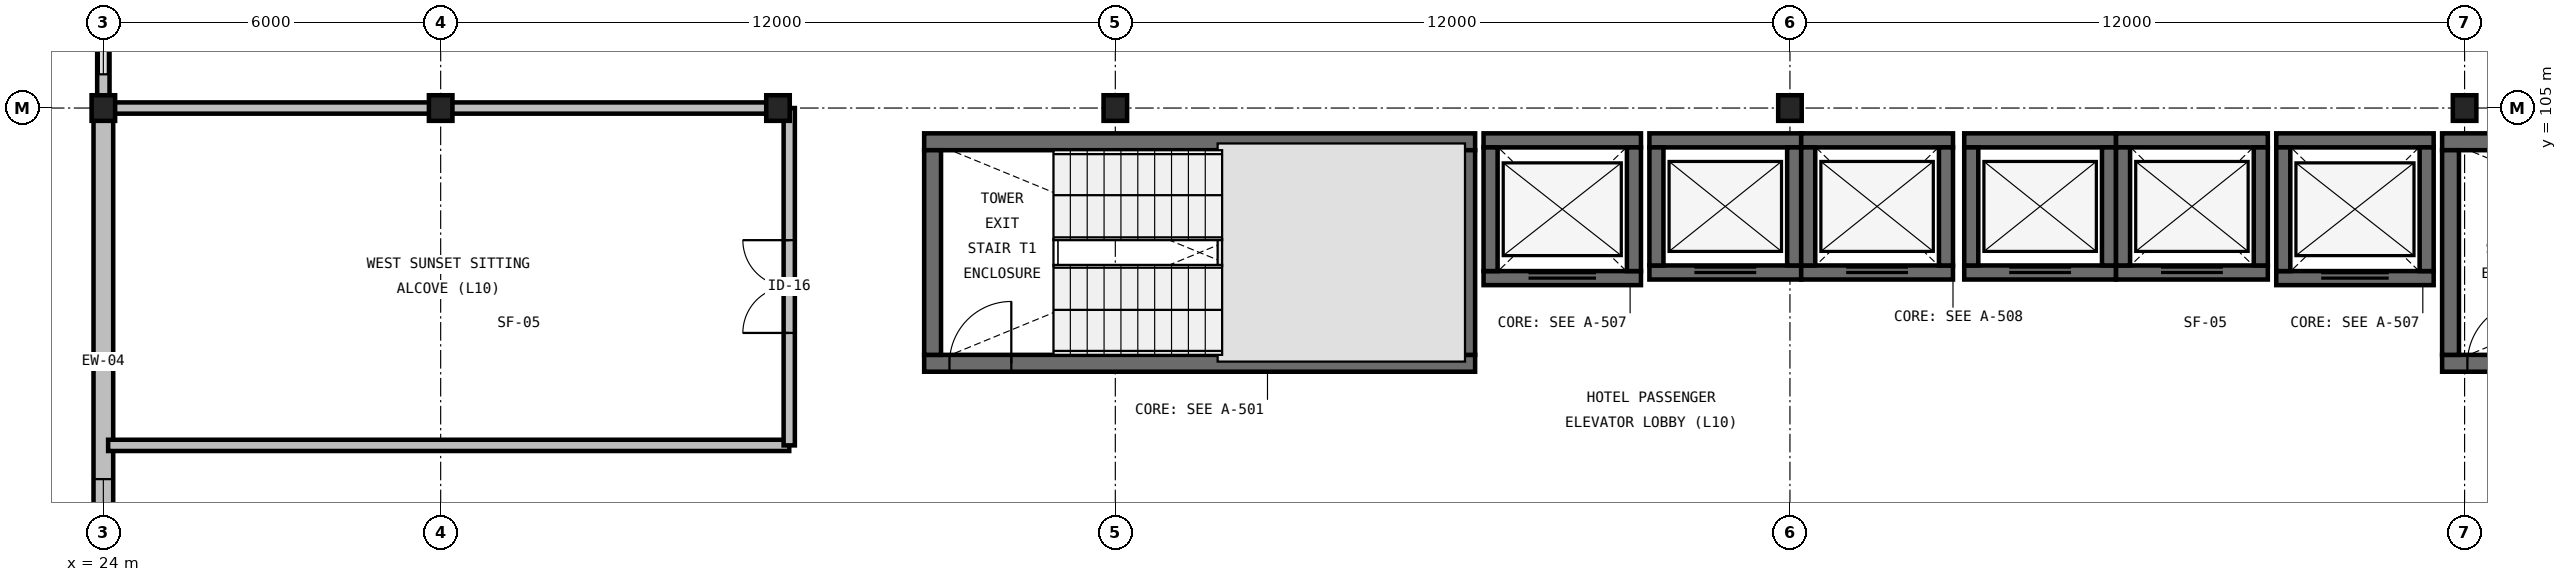
"""IFC4 building model, lengths in metres.
Left out: names, types, materials, properties, quantities, classifications, styles, units other than length and angle.
Written with IfcOpenShell. Run it as: python <this file> out.ifc"""

import sys

from ifc_helpers import new_model, si_unit, direction, frame, frame_2d, origin, origin_2d, place, context, subcontext, project, spatial, rectangle, i_section, extrude, element, fill, save


model = new_model("IFC4")
c1 = context("Model", 3, precision=1e-05, world=origin(), true_north=direction((0.0, 1.0)))
c2 = subcontext(c1, "Body", "Model", "MODEL_VIEW")
j1 = project(units=[si_unit("LENGTHUNIT", "METRE"), si_unit("PLANEANGLEUNIT", "RADIAN")], contexts=[c1])
p1 = place(None, origin())
s1 = spatial("IfcSite", under=j1, at=p1, CompositionType="ELEMENT")
p2 = place(p1, origin())
s2 = spatial("IfcBuilding", under=s1, at=p2, CompositionType="ELEMENT")
p3 = place(p2, frame((0.0, 0.0, 45.6)))
s3 = spatial("IfcBuildingStorey", under=s2, at=p3, CompositionType="ELEMENT", Elevation=45.6)
for number, where, z_axis, x_axis in (
    (1, (24.0, 105.0, 0.0), (0.0, 0.0, 1.0), (1.0, 0.0, 0.0)),
    (2, (30.0, 105.0, 0.0), (0.0, 0.0, 1.0), (1.0, 0.0, 0.0)),
    (3, (36.0, 105.0, 0.0), (0.0, 0.0, 1.0), (1.0, 0.0, 0.0)),
    (4, (42.0, 105.0, 0.0), (0.0, 0.0, 1.0), (1.0, 0.0, 0.0)),
    (5, (54.0, 105.0, 0.0), (0.0, 0.0, 1.0), (1.0, 0.0, 0.0)),
    (6, (66.0, 105.0, 0.0), (0.0, 0.0, 1.0), (1.0, 0.0, 0.0)),
):
    element("IfcColumn", number, at=place(p3, frame(where, z_axis=z_axis, x_axis=x_axis)), inside=s3, PredefinedType="COLUMN", context=c2, shape_type="SweptSolid", body=[
        extrude(i_section(OverallWidth=0.419, OverallDepth=0.455, WebThickness=0.042, FlangeThickness=0.068, FilletRadius=0.031, at=origin_2d()), origin(), (0.0, 0.0, 1.0), 3.6),
    ])
p4 = place(p3, frame((38.6, 100.46, 0.0), z_axis=(0.0, 0.0, 1.0), x_axis=(1.0, 0.0, 0.0)))
e7 = element("IfcWall", 7, at=p4, inside=s3, PredefinedType="SHEAR", context=c2, shape_type="SweptSolid", body=[
    extrude(rectangle(XDim=9.8, YDim=0.3, at=frame_2d((4.9, 0.0))), origin(), (0.0, 0.0, 1.0), 3.6),
])
p5 = place(p4, frame((0.45, 0.0, 0.0)))
e8 = element("IfcOpeningElement", 8, at=p5, cuts=e7, PredefinedType="OPENING", context=c2, shape_type="SweptSolid", body=[
    extrude(rectangle(XDim=1.1, YDim=2.2, at=frame_2d((0.55, 1.1))), frame((0.0, 0.165, 0.0), z_axis=(0.0, -1.0, 0.0), x_axis=(1.0, 0.0, 0.0)), (0.0, 0.0, 1.0), 0.33),
])
p6 = place(p3, frame((48.4, 104.4, 0.0), z_axis=(0.0, 0.0, 1.0), x_axis=(-1.0, 0.0, 0.0)))
e9 = element("IfcWall", 9, at=p6, inside=s3, PredefinedType="SHEAR", context=c2, shape_type="SweptSolid", body=[
    extrude(rectangle(XDim=9.8, YDim=0.3, at=frame_2d((4.9, 0.0))), origin(), (0.0, 0.0, 1.0), 3.6),
])
for number, where, z_axis, x_axis in (
    (10, (38.75, 104.25, 0.0), (0.0, 0.0, 1.0), (0.0, -1.0, 0.0)),
    (11, (48.25, 100.61, 0.0), (0.0, 0.0, 1.0), (0.0, 1.0, 0.0)),
):
    element("IfcWall", number, at=place(p3, frame(where, z_axis=z_axis, x_axis=x_axis)), inside=s3, PredefinedType="SHEAR", context=c2, shape_type="SweptSolid", body=[
        extrude(rectangle(XDim=3.64, YDim=0.3, at=frame_2d((1.82, 0.0))), origin(), (0.0, 0.0, 1.0), 3.6),
    ])
p7 = place(p3, frame((65.6, 100.46, 0.0), z_axis=(0.0, 0.0, 1.0), x_axis=(1.0, 0.0, 0.0)))
e12 = element("IfcWall", 12, at=p7, inside=s3, PredefinedType="SHEAR", context=c2, shape_type="SweptSolid", body=[
    extrude(rectangle(XDim=9.8, YDim=0.3, at=frame_2d((4.9, 0.0))), origin(), (0.0, 0.0, 1.0), 3.6),
])
p8 = place(p7, frame((0.45, 0.0, 0.0)))
e13 = element("IfcOpeningElement", 13, at=p8, cuts=e12, PredefinedType="OPENING", context=c2, shape_type="SweptSolid", body=[
    extrude(rectangle(XDim=1.1, YDim=2.2, at=frame_2d((0.55, 1.1))), frame((0.0, 0.165, 0.0), z_axis=(0.0, -1.0, 0.0), x_axis=(1.0, 0.0, 0.0)), (0.0, 0.0, 1.0), 0.33),
])
p9 = place(p3, frame((75.4, 104.4, 0.0), z_axis=(0.0, 0.0, 1.0), x_axis=(-1.0, 0.0, 0.0)))
e14 = element("IfcWall", 14, at=p9, inside=s3, PredefinedType="SHEAR", context=c2, shape_type="SweptSolid", body=[
    extrude(rectangle(XDim=9.8, YDim=0.3, at=frame_2d((4.9, 0.0))), origin(), (0.0, 0.0, 1.0), 3.6),
])
p10 = place(p3, frame((65.75, 104.25, 0.0), z_axis=(0.0, 0.0, 1.0), x_axis=(0.0, -1.0, 0.0)))
e15 = element("IfcWall", 15, at=p10, inside=s3, PredefinedType="SHEAR", context=c2, shape_type="SweptSolid", body=[
    extrude(rectangle(XDim=3.64, YDim=0.3, at=frame_2d((1.82, 0.0))), origin(), (0.0, 0.0, 1.0), 3.6),
])
p11 = place(p3, frame((48.55, 101.975, 0.0), z_axis=(0.0, 0.0, 1.0), x_axis=(1.0, 0.0, 0.0)))
e16 = element("IfcWall", 16, at=p11, inside=s3, PredefinedType="SHEAR", context=c2, shape_type="SweptSolid", body=[
    extrude(rectangle(XDim=2.8, YDim=0.25, at=frame_2d((1.4, 0.0))), origin(), (0.0, 0.0, 1.0), 3.6),
])
p12 = place(p11, frame((0.8, 0.0, 0.0)))
e17 = element("IfcOpeningElement", 17, at=p12, cuts=e16, PredefinedType="OPENING", context=c2, shape_type="SweptSolid", body=[
    extrude(rectangle(XDim=1.2, YDim=2.2, at=frame_2d((0.6, 1.1))), frame((0.0, 0.14, 0.0), z_axis=(0.0, -1.0, 0.0), x_axis=(1.0, 0.0, 0.0)), (0.0, 0.0, 1.0), 0.28),
])
p13 = place(p3, frame((51.35, 104.425, 0.0), z_axis=(0.0, 0.0, 1.0), x_axis=(-1.0, 0.0, 0.0)))
e18 = element("IfcWall", 18, at=p13, inside=s3, PredefinedType="SHEAR", context=c2, shape_type="SweptSolid", body=[
    extrude(rectangle(XDim=2.8, YDim=0.25, at=frame_2d((1.4, 0.0))), origin(), (0.0, 0.0, 1.0), 3.6),
])
for number, where, z_axis, x_axis in (
    (19, (48.675, 104.3, 0.0), (0.0, 0.0, 1.0), (0.0, -1.0, 0.0)),
    (20, (51.225, 102.1, 0.0), (0.0, 0.0, 1.0), (0.0, 1.0, 0.0)),
):
    element("IfcWall", number, at=place(p3, frame(where, z_axis=z_axis, x_axis=x_axis)), inside=s3, PredefinedType="SHEAR", context=c2, shape_type="SweptSolid", body=[
        extrude(rectangle(XDim=2.2, YDim=0.25, at=frame_2d((1.1, 0.0))), origin(), (0.0, 0.0, 1.0), 3.6),
    ])
p14 = place(p3, frame((62.65, 101.975, 0.0), z_axis=(0.0, 0.0, 1.0), x_axis=(1.0, 0.0, 0.0)))
e21 = element("IfcWall", 21, at=p14, inside=s3, PredefinedType="SHEAR", context=c2, shape_type="SweptSolid", body=[
    extrude(rectangle(XDim=2.8, YDim=0.25, at=frame_2d((1.4, 0.0))), origin(), (0.0, 0.0, 1.0), 3.6),
])
p15 = place(p14, frame((0.8, 0.0, 0.0)))
e22 = element("IfcOpeningElement", 22, at=p15, cuts=e21, PredefinedType="OPENING", context=c2, shape_type="SweptSolid", body=[
    extrude(rectangle(XDim=1.2, YDim=2.2, at=frame_2d((0.6, 1.1))), frame((0.0, 0.14, 0.0), z_axis=(0.0, -1.0, 0.0), x_axis=(1.0, 0.0, 0.0)), (0.0, 0.0, 1.0), 0.28),
])
p16 = place(p3, frame((65.45, 104.425, 0.0), z_axis=(0.0, 0.0, 1.0), x_axis=(-1.0, 0.0, 0.0)))
e23 = element("IfcWall", 23, at=p16, inside=s3, PredefinedType="SHEAR", context=c2, shape_type="SweptSolid", body=[
    extrude(rectangle(XDim=2.8, YDim=0.25, at=frame_2d((1.4, 0.0))), origin(), (0.0, 0.0, 1.0), 3.6),
])
for number, where, z_axis, x_axis in (
    (24, (62.775, 104.3, 0.0), (0.0, 0.0, 1.0), (0.0, -1.0, 0.0)),
    (25, (65.325, 102.1, 0.0), (0.0, 0.0, 1.0), (0.0, 1.0, 0.0)),
):
    element("IfcWall", number, at=place(p3, frame(where, z_axis=z_axis, x_axis=x_axis)), inside=s3, PredefinedType="SHEAR", context=c2, shape_type="SweptSolid", body=[
        extrude(rectangle(XDim=2.2, YDim=0.25, at=frame_2d((1.1, 0.0))), origin(), (0.0, 0.0, 1.0), 3.6),
    ])
p17 = place(p3, frame((51.5, 102.075, 0.0), z_axis=(0.0, 0.0, 1.0), x_axis=(1.0, 0.0, 0.0)))
e26 = element("IfcWall", 26, at=p17, inside=s3, PredefinedType="SHEAR", context=c2, shape_type="SweptSolid", body=[
    extrude(rectangle(XDim=2.7, YDim=0.25, at=frame_2d((1.35, 0.0))), origin(), (0.0, 0.0, 1.0), 3.6),
])
p18 = place(p17, frame((0.8, 0.0, 0.0)))
e27 = element("IfcOpeningElement", 27, at=p18, cuts=e26, PredefinedType="OPENING", context=c2, shape_type="SweptSolid", body=[
    extrude(rectangle(XDim=1.1, YDim=2.2, at=frame_2d((0.55, 1.1))), frame((0.0, 0.14, 0.0), z_axis=(0.0, -1.0, 0.0), x_axis=(1.0, 0.0, 0.0)), (0.0, 0.0, 1.0), 0.28),
])
p19 = place(p3, frame((54.2, 104.425, 0.0), z_axis=(0.0, 0.0, 1.0), x_axis=(-1.0, 0.0, 0.0)))
e28 = element("IfcWall", 28, at=p19, inside=s3, PredefinedType="SHEAR", context=c2, shape_type="SweptSolid", body=[
    extrude(rectangle(XDim=2.7, YDim=0.25, at=frame_2d((1.35, 0.0))), origin(), (0.0, 0.0, 1.0), 3.6),
])
for number, where, z_axis, x_axis in (
    (29, (51.625, 104.3, 0.0), (0.0, 0.0, 1.0), (0.0, -1.0, 0.0)),
    (30, (54.075, 102.2, 0.0), (0.0, 0.0, 1.0), (0.0, 1.0, 0.0)),
):
    element("IfcWall", number, at=place(p3, frame(where, z_axis=z_axis, x_axis=x_axis)), inside=s3, PredefinedType="SHEAR", context=c2, shape_type="SweptSolid", body=[
        extrude(rectangle(XDim=2.1, YDim=0.25, at=frame_2d((1.05, 0.0))), origin(), (0.0, 0.0, 1.0), 3.6),
    ])
p20 = place(p3, frame((54.2, 102.075, 0.0), z_axis=(0.0, 0.0, 1.0), x_axis=(1.0, 0.0, 0.0)))
e31 = element("IfcWall", 31, at=p20, inside=s3, PredefinedType="SHEAR", context=c2, shape_type="SweptSolid", body=[
    extrude(rectangle(XDim=2.7, YDim=0.25, at=frame_2d((1.35, 0.0))), origin(), (0.0, 0.0, 1.0), 3.6),
])
p21 = place(p20, frame((0.8, 0.0, 0.0)))
e32 = element("IfcOpeningElement", 32, at=p21, cuts=e31, PredefinedType="OPENING", context=c2, shape_type="SweptSolid", body=[
    extrude(rectangle(XDim=1.1, YDim=2.2, at=frame_2d((0.55, 1.1))), frame((0.0, 0.14, 0.0), z_axis=(0.0, -1.0, 0.0), x_axis=(1.0, 0.0, 0.0)), (0.0, 0.0, 1.0), 0.28),
])
p22 = place(p3, frame((56.9, 104.425, 0.0), z_axis=(0.0, 0.0, 1.0), x_axis=(-1.0, 0.0, 0.0)))
e33 = element("IfcWall", 33, at=p22, inside=s3, PredefinedType="SHEAR", context=c2, shape_type="SweptSolid", body=[
    extrude(rectangle(XDim=2.7, YDim=0.25, at=frame_2d((1.35, 0.0))), origin(), (0.0, 0.0, 1.0), 3.6),
])
for number, where, z_axis, x_axis in (
    (34, (54.325, 104.3, 0.0), (0.0, 0.0, 1.0), (0.0, -1.0, 0.0)),
    (35, (56.775, 102.2, 0.0), (0.0, 0.0, 1.0), (0.0, 1.0, 0.0)),
):
    element("IfcWall", number, at=place(p3, frame(where, z_axis=z_axis, x_axis=x_axis)), inside=s3, PredefinedType="SHEAR", context=c2, shape_type="SweptSolid", body=[
        extrude(rectangle(XDim=2.1, YDim=0.25, at=frame_2d((1.05, 0.0))), origin(), (0.0, 0.0, 1.0), 3.6),
    ])
p23 = place(p3, frame((57.1, 102.075, 0.0), z_axis=(0.0, 0.0, 1.0), x_axis=(1.0, 0.0, 0.0)))
e36 = element("IfcWall", 36, at=p23, inside=s3, PredefinedType="SHEAR", context=c2, shape_type="SweptSolid", body=[
    extrude(rectangle(XDim=2.7, YDim=0.25, at=frame_2d((1.35, 0.0))), origin(), (0.0, 0.0, 1.0), 3.6),
])
p24 = place(p23, frame((0.8, 0.0, 0.0)))
e37 = element("IfcOpeningElement", 37, at=p24, cuts=e36, PredefinedType="OPENING", context=c2, shape_type="SweptSolid", body=[
    extrude(rectangle(XDim=1.1, YDim=2.2, at=frame_2d((0.55, 1.1))), frame((0.0, 0.14, 0.0), z_axis=(0.0, -1.0, 0.0), x_axis=(1.0, 0.0, 0.0)), (0.0, 0.0, 1.0), 0.28),
])
p25 = place(p3, frame((59.8, 104.425, 0.0), z_axis=(0.0, 0.0, 1.0), x_axis=(-1.0, 0.0, 0.0)))
e38 = element("IfcWall", 38, at=p25, inside=s3, PredefinedType="SHEAR", context=c2, shape_type="SweptSolid", body=[
    extrude(rectangle(XDim=2.7, YDim=0.25, at=frame_2d((1.35, 0.0))), origin(), (0.0, 0.0, 1.0), 3.6),
])
for number, where, z_axis, x_axis in (
    (39, (57.225, 104.3, 0.0), (0.0, 0.0, 1.0), (0.0, -1.0, 0.0)),
    (40, (59.675, 102.2, 0.0), (0.0, 0.0, 1.0), (0.0, 1.0, 0.0)),
):
    element("IfcWall", number, at=place(p3, frame(where, z_axis=z_axis, x_axis=x_axis)), inside=s3, PredefinedType="SHEAR", context=c2, shape_type="SweptSolid", body=[
        extrude(rectangle(XDim=2.1, YDim=0.25, at=frame_2d((1.05, 0.0))), origin(), (0.0, 0.0, 1.0), 3.6),
    ])
p26 = place(p3, frame((59.8, 102.075, 0.0), z_axis=(0.0, 0.0, 1.0), x_axis=(1.0, 0.0, 0.0)))
e41 = element("IfcWall", 41, at=p26, inside=s3, PredefinedType="SHEAR", context=c2, shape_type="SweptSolid", body=[
    extrude(rectangle(XDim=2.7, YDim=0.25, at=frame_2d((1.35, 0.0))), origin(), (0.0, 0.0, 1.0), 3.6),
])
p27 = place(p26, frame((0.8, 0.0, 0.0)))
e42 = element("IfcOpeningElement", 42, at=p27, cuts=e41, PredefinedType="OPENING", context=c2, shape_type="SweptSolid", body=[
    extrude(rectangle(XDim=1.1, YDim=2.2, at=frame_2d((0.55, 1.1))), frame((0.0, 0.14, 0.0), z_axis=(0.0, -1.0, 0.0), x_axis=(1.0, 0.0, 0.0)), (0.0, 0.0, 1.0), 0.28),
])
p28 = place(p3, frame((62.5, 104.425, 0.0), z_axis=(0.0, 0.0, 1.0), x_axis=(-1.0, 0.0, 0.0)))
e43 = element("IfcWall", 43, at=p28, inside=s3, PredefinedType="SHEAR", context=c2, shape_type="SweptSolid", body=[
    extrude(rectangle(XDim=2.7, YDim=0.25, at=frame_2d((1.35, 0.0))), origin(), (0.0, 0.0, 1.0), 3.6),
])
for number, where, z_axis, x_axis in (
    (44, (59.925, 104.3, 0.0), (0.0, 0.0, 1.0), (0.0, -1.0, 0.0)),
    (45, (62.375, 102.2, 0.0), (0.0, 0.0, 1.0), (0.0, 1.0, 0.0)),
):
    element("IfcWall", number, at=place(p3, frame(where, z_axis=z_axis, x_axis=x_axis)), inside=s3, PredefinedType="SHEAR", context=c2, shape_type="SweptSolid", body=[
        extrude(rectangle(XDim=2.1, YDim=0.25, at=frame_2d((1.05, 0.0))), origin(), (0.0, 0.0, 1.0), 3.6),
    ])
p29 = place(p3, frame((24.0, 105.0, 0.0), z_axis=(0.0, 0.0, 1.0), x_axis=(0.0, -1.0, 0.0)))
e46 = element("IfcWall", 46, at=p29, inside=s3, PredefinedType="STANDARD", context=c2, shape_type="SweptSolid", body=[
    extrude(rectangle(XDim=9.0, YDim=0.35, at=frame_2d((4.5, 0.0))), origin(), (0.0, 0.0, 1.0), 2.981),
])
p30 = place(p29, frame((6.6, 0.0, 0.85)))
e47 = element("IfcOpeningElement", 47, at=p30, cuts=e46, PredefinedType="OPENING", context=c2, shape_type="SweptSolid", body=[
    extrude(rectangle(XDim=1.8, YDim=1.5, at=frame_2d((0.9, 0.75))), frame((0.0, 0.19, 0.0), z_axis=(0.0, -1.0, 0.0), x_axis=(1.0, 0.0, 0.0)), (0.0, 0.0, 1.0), 0.38),
])
p31 = place(p3, frame((24.0, 117.0, 0.0), z_axis=(0.0, 0.0, 1.0), x_axis=(0.0, -1.0, 0.0)))
e48 = element("IfcWall", 48, at=p31, inside=s3, PredefinedType="PARAPET", context=c2, shape_type="SweptSolid", body=[
    extrude(rectangle(XDim=12.0, YDim=0.22, at=frame_2d((6.0, 0.0))), origin(), (0.0, 0.0, 1.0), 0.2),
])
p32 = place(p3, frame((24.085, 99.0, 0.0), z_axis=(0.0, 0.0, 1.0), x_axis=(1.0, 0.0, 0.0)))
e49 = element("IfcWall", 49, at=p32, inside=s3, PredefinedType="PARTITIONING", context=c2, shape_type="SweptSolid", body=[
    extrude(rectangle(XDim=12.115, YDim=0.2, at=frame_2d((6.057, 0.0))), origin(), (0.0, 0.0, 1.0), 3.29),
])
p33 = place(p3, frame((36.2, 99.0, 0.0), z_axis=(0.0, 0.0, 1.0), x_axis=(0.0, 1.0, 0.0)))
e50 = element("IfcWall", 50, at=p33, inside=s3, PredefinedType="PARTITIONING", context=c2, shape_type="SweptSolid", body=[
    extrude(rectangle(XDim=6.0, YDim=0.2, at=frame_2d((3.0, 0.0))), origin(), (0.0, 0.0, 1.0), 3.29),
])
p34 = place(p33, frame((2.0, 0.0, 0.0)))
e51 = element("IfcOpeningElement", 51, at=p34, cuts=e50, PredefinedType="OPENING", context=c2, shape_type="SweptSolid", body=[
    extrude(rectangle(XDim=1.65, YDim=2.25, at=frame_2d((0.825, 1.125))), frame((0.0, 0.115, 0.0), z_axis=(0.0, -1.0, 0.0), x_axis=(1.0, 0.0, 0.0)), (0.0, 0.0, 1.0), 0.23),
])
p35 = place(p3, frame((36.2, 105.0, 0.0), z_axis=(0.0, 0.0, 1.0), x_axis=(-1.0, 0.0, 0.0)))
e52 = element("IfcWall", 52, at=p35, inside=s3, PredefinedType="PARTITIONING", context=c2, shape_type="SweptSolid", body=[
    extrude(rectangle(XDim=12.115, YDim=0.2, at=frame_2d((6.057, 0.0))), origin(), (0.0, 0.0, 1.0), 2.736),
])
p36 = place(p5, origin())
e53 = element("IfcDoor", 53, at=p36, inside=s3, OperationType="SINGLE_SWING_RIGHT", PredefinedType="DOOR", context=c2, shape_type="SweptSolid", body=[
    extrude(rectangle(XDim=1.1, YDim=2.2, at=frame_2d((0.55, 1.1))), frame((0.0, 0.025, 0.0), z_axis=(0.0, -1.0, 0.0), x_axis=(1.0, 0.0, 0.0)), (0.0, 0.0, 1.0), 0.05),
])
fill(e8, e53)
p37 = place(p8, origin())
e54 = element("IfcDoor", 54, at=p37, inside=s3, OperationType="SINGLE_SWING_RIGHT", PredefinedType="DOOR", context=c2, shape_type="SweptSolid", body=[
    extrude(rectangle(XDim=1.1, YDim=2.2, at=frame_2d((0.55, 1.1))), frame((0.0, 0.025, 0.0), z_axis=(0.0, -1.0, 0.0), x_axis=(1.0, 0.0, 0.0)), (0.0, 0.0, 1.0), 0.05),
])
fill(e13, e54)
p38 = place(p12, origin())
e55 = element("IfcDoor", 55, at=p38, inside=s3, OperationType="DOUBLE_DOOR_SLIDING", PredefinedType="DOOR", context=c2, shape_type="SweptSolid", body=[
    extrude(rectangle(XDim=1.2, YDim=2.2, at=frame_2d((0.6, 1.1))), frame((0.0, 0.025, 0.0), z_axis=(0.0, -1.0, 0.0), x_axis=(1.0, 0.0, 0.0)), (0.0, 0.0, 1.0), 0.05),
])
fill(e17, e55)
p39 = place(p15, origin())
e56 = element("IfcDoor", 56, at=p39, inside=s3, OperationType="DOUBLE_DOOR_SLIDING", PredefinedType="DOOR", context=c2, shape_type="SweptSolid", body=[
    extrude(rectangle(XDim=1.2, YDim=2.2, at=frame_2d((0.6, 1.1))), frame((0.0, 0.025, 0.0), z_axis=(0.0, -1.0, 0.0), x_axis=(1.0, 0.0, 0.0)), (0.0, 0.0, 1.0), 0.05),
])
fill(e22, e56)
p40 = place(p18, origin())
e57 = element("IfcDoor", 57, at=p40, inside=s3, OperationType="DOUBLE_DOOR_SLIDING", PredefinedType="DOOR", context=c2, shape_type="SweptSolid", body=[
    extrude(rectangle(XDim=1.1, YDim=2.2, at=frame_2d((0.55, 1.1))), frame((0.0, 0.025, 0.0), z_axis=(0.0, -1.0, 0.0), x_axis=(1.0, 0.0, 0.0)), (0.0, 0.0, 1.0), 0.05),
])
fill(e27, e57)
p41 = place(p21, origin())
e58 = element("IfcDoor", 58, at=p41, inside=s3, OperationType="DOUBLE_DOOR_SLIDING", PredefinedType="DOOR", context=c2, shape_type="SweptSolid", body=[
    extrude(rectangle(XDim=1.1, YDim=2.2, at=frame_2d((0.55, 1.1))), frame((0.0, 0.025, 0.0), z_axis=(0.0, -1.0, 0.0), x_axis=(1.0, 0.0, 0.0)), (0.0, 0.0, 1.0), 0.05),
])
fill(e32, e58)
p42 = place(p24, origin())
e59 = element("IfcDoor", 59, at=p42, inside=s3, OperationType="DOUBLE_DOOR_SLIDING", PredefinedType="DOOR", context=c2, shape_type="SweptSolid", body=[
    extrude(rectangle(XDim=1.1, YDim=2.2, at=frame_2d((0.55, 1.1))), frame((0.0, 0.025, 0.0), z_axis=(0.0, -1.0, 0.0), x_axis=(1.0, 0.0, 0.0)), (0.0, 0.0, 1.0), 0.05),
])
fill(e37, e59)
p43 = place(p27, origin())
e60 = element("IfcDoor", 60, at=p43, inside=s3, OperationType="DOUBLE_DOOR_SLIDING", PredefinedType="DOOR", context=c2, shape_type="SweptSolid", body=[
    extrude(rectangle(XDim=1.1, YDim=2.2, at=frame_2d((0.55, 1.1))), frame((0.0, 0.025, 0.0), z_axis=(0.0, -1.0, 0.0), x_axis=(1.0, 0.0, 0.0)), (0.0, 0.0, 1.0), 0.05),
])
fill(e42, e60)
p44 = place(p30, origin())
e61 = element("IfcWindow", 61, at=p44, inside=s3, PartitioningType="SINGLE_PANEL", PredefinedType="WINDOW", context=c2, shape_type="SweptSolid", body=[
    extrude(rectangle(XDim=1.8, YDim=1.5, at=frame_2d((0.9, 0.75))), frame((0.0, 0.03, 0.0), z_axis=(0.0, -1.0, 0.0), x_axis=(1.0, 0.0, 0.0)), (0.0, 0.0, 1.0), 0.06),
])
fill(e47, e61)
p45 = place(p34, origin())
e62 = element("IfcDoor", 62, at=p45, inside=s3, OperationType="DOUBLE_DOOR_SINGLE_SWING", PredefinedType="DOOR", context=c2, shape_type="SweptSolid", body=[
    extrude(rectangle(XDim=1.65, YDim=2.25, at=frame_2d((0.825, 1.125))), frame((0.0, 0.025, 0.0), z_axis=(0.0, -1.0, 0.0), x_axis=(1.0, 0.0, 0.0)), (0.0, 0.0, 1.0), 0.05),
])
fill(e51, e62)
save(model, sys.argv[1])
